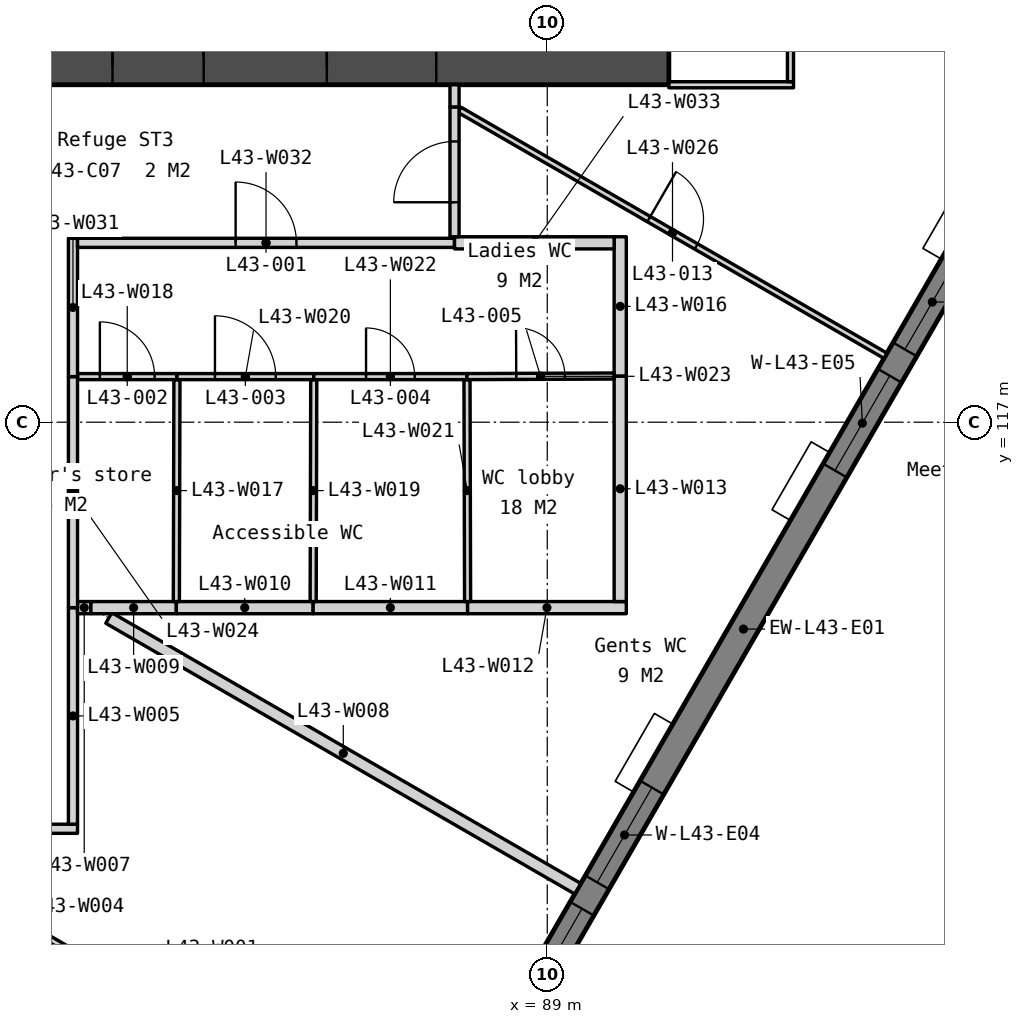
"""IFC4 building model, lengths in metres.
Left out: names, types, materials, properties, quantities, classifications, styles, units other than length and angle.
Written with IfcOpenShell. Run it as: python <this file> out.ifc"""

import sys

from ifc_helpers import new_model, si_unit, direction, frame, frame_2d, origin, place, context, subcontext, project, spatial, polyline, rectangle, outline, extrude, element, fill, save


model = new_model("IFC4")
c1 = context("Model", 3, precision=1e-05, world=origin(), true_north=direction((0.0, 1.0)))
c2 = subcontext(c1, "Body", "Model", "MODEL_VIEW")
j1 = project(units=[si_unit("LENGTHUNIT", "METRE"), si_unit("PLANEANGLEUNIT", "RADIAN")], contexts=[c1])
p1 = place(None, origin())
s1 = spatial("IfcSite", under=j1, at=p1, CompositionType="ELEMENT")
p2 = place(p1, origin())
s2 = spatial("IfcBuilding", under=s1, at=p2, CompositionType="ELEMENT")
p3 = place(p2, frame((0.0, 0.0, 171.5)))
s3 = spatial("IfcBuildingStorey", under=s2, at=p3, CompositionType="ELEMENT", Elevation=171.5)
p4 = place(p3, frame((69.0, 122.85, 0.0), z_axis=(0.0, 0.0, 1.0), x_axis=(1.0, 0.0, 0.0)))
e1 = element("IfcWall", 1, at=p4, inside=s3, PredefinedType="SOLIDWALL", context=c2, shape_type="SweptSolid", body=[
    extrude(rectangle(XDim=22.0, YDim=0.6, at=frame_2d((11.0, 0.0))), origin(), (0.0, 0.0, 1.0), 3.65),
])
p5 = place(p4, frame((16.375, 0.0, 0.0)))
e2 = element("IfcOpeningElement", 2, at=p5, cuts=e1, PredefinedType="OPENING", context=c2, shape_type="SweptSolid", body=[
    extrude(rectangle(XDim=1.8, YDim=2.1, at=frame_2d((0.9, 1.05))), frame((0.0, 0.31, 0.0), z_axis=(0.0, -1.0, 0.0), x_axis=(1.0, 0.0, 0.0)), (0.0, 0.0, 1.0), 0.62),
])
p6 = place(p4, frame((3.825, 0.0, 0.0)))
e3 = element("IfcOpeningElement", 3, at=p6, cuts=e1, PredefinedType="OPENING", context=c2, shape_type="SweptSolid", body=[
    extrude(rectangle(XDim=1.8, YDim=2.1, at=frame_2d((0.9, 1.05))), frame((0.0, 0.31, 0.0), z_axis=(0.0, -1.0, 0.0), x_axis=(1.0, 0.0, 0.0)), (0.0, 0.0, 1.0), 0.62),
])
p7 = place(p4, frame((12.85, 0.0, 0.0)))
e4 = element("IfcOpeningElement", 4, at=p7, cuts=e1, PredefinedType="OPENING", context=c2, shape_type="SweptSolid", body=[
    extrude(rectangle(XDim=1.5, YDim=2.1, at=frame_2d((0.75, 1.05))), frame((0.0, 0.31, 0.0), z_axis=(0.0, -1.0, 0.0), x_axis=(1.0, 0.0, 0.0)), (0.0, 0.0, 1.0), 0.62),
])
p8 = place(p3, frame((82.105, 96.067, -0.15), z_axis=(0.0, 0.0, 1.0), x_axis=(0.499997369791, 0.866026922331, 0.0)))
e5 = element("IfcWall", 5, at=p8, inside=s3, PredefinedType="SOLIDWALL", context=c2, shape_type="SweptSolid", body=[
    extrude(outline(polyline([(40.486, 0.0), (40.486, 3.8), (0.0, 3.8), (0.0, 0.0), (40.486, 0.0)])), frame((0.0, 0.225, 0.0), z_axis=(0.0, -1.0, 0.0), x_axis=(1.0, 0.0, 0.0)), (0.0, 0.0, 1.0), 0.45),
])
p9 = place(p8, frame((3.011, 0.0, 0.95)))
e6 = element("IfcOpeningElement", 6, at=p9, cuts=e5, PredefinedType="OPENING", context=c2, shape_type="SweptSolid", body=[
    extrude(rectangle(XDim=1.8, YDim=2.2, at=frame_2d((0.9, 1.1))), frame((0.0, 0.235, 0.0), z_axis=(0.0, -1.0, 0.0), x_axis=(1.0, 0.0, 0.0)), (0.0, 0.0, 1.0), 0.47),
])
p10 = place(p8, frame((5.311, 0.0, 0.95)))
e7 = element("IfcOpeningElement", 7, at=p10, cuts=e5, PredefinedType="OPENING", context=c2, shape_type="SweptSolid", body=[
    extrude(rectangle(XDim=1.8, YDim=2.2, at=frame_2d((0.9, 1.1))), frame((0.0, 0.235, 0.0), z_axis=(0.0, -1.0, 0.0), x_axis=(1.0, 0.0, 0.0)), (0.0, 0.0, 1.0), 0.47),
])
p11 = place(p8, frame((13.132, 0.0, 0.95)))
e8 = element("IfcOpeningElement", 8, at=p11, cuts=e5, PredefinedType="OPENING", context=c2, shape_type="SweptSolid", body=[
    extrude(rectangle(XDim=1.8, YDim=2.2, at=frame_2d((0.9, 1.1))), frame((0.0, 0.235, 0.0), z_axis=(0.0, -1.0, 0.0), x_axis=(1.0, 0.0, 0.0)), (0.0, 0.0, 1.0), 0.47),
])
p12 = place(p8, frame((15.432, 0.0, 0.95)))
e9 = element("IfcOpeningElement", 9, at=p12, cuts=e5, PredefinedType="OPENING", context=c2, shape_type="SweptSolid", body=[
    extrude(rectangle(XDim=1.8, YDim=2.2, at=frame_2d((0.9, 1.1))), frame((0.0, 0.235, 0.0), z_axis=(0.0, -1.0, 0.0), x_axis=(1.0, 0.0, 0.0)), (0.0, 0.0, 1.0), 0.47),
])
p13 = place(p8, frame((23.254, 0.0, 0.95)))
e10 = element("IfcOpeningElement", 10, at=p13, cuts=e5, PredefinedType="OPENING", context=c2, shape_type="SweptSolid", body=[
    extrude(rectangle(XDim=1.8, YDim=2.2, at=frame_2d((0.9, 1.1))), frame((0.0, 0.235, 0.0), z_axis=(0.0, -1.0, 0.0), x_axis=(1.0, 0.0, 0.0)), (0.0, 0.0, 1.0), 0.47),
])
p14 = place(p8, frame((25.554, 0.0, 0.95)))
e11 = element("IfcOpeningElement", 11, at=p14, cuts=e5, PredefinedType="OPENING", context=c2, shape_type="SweptSolid", body=[
    extrude(rectangle(XDim=1.8, YDim=2.2, at=frame_2d((0.9, 1.1))), frame((0.0, 0.235, 0.0), z_axis=(0.0, -1.0, 0.0), x_axis=(1.0, 0.0, 0.0)), (0.0, 0.0, 1.0), 0.47),
])
p15 = place(p8, frame((33.375, 0.0, 0.95)))
e12 = element("IfcOpeningElement", 12, at=p15, cuts=e5, PredefinedType="OPENING", context=c2, shape_type="SweptSolid", body=[
    extrude(rectangle(XDim=1.8, YDim=2.2, at=frame_2d((0.9, 1.1))), frame((0.0, 0.235, 0.0), z_axis=(0.0, -1.0, 0.0), x_axis=(1.0, 0.0, 0.0)), (0.0, 0.0, 1.0), 0.47),
])
p16 = place(p8, frame((35.675, 0.0, 0.95)))
e13 = element("IfcOpeningElement", 13, at=p16, cuts=e5, PredefinedType="OPENING", context=c2, shape_type="SweptSolid", body=[
    extrude(rectangle(XDim=1.8, YDim=2.2, at=frame_2d((0.9, 1.1))), frame((0.0, 0.235, 0.0), z_axis=(0.0, -1.0, 0.0), x_axis=(1.0, 0.0, 0.0)), (0.0, 0.0, 1.0), 0.47),
])
p17 = place(p3, frame((80.0, 108.969, 0.0), z_axis=(0.0, 0.0, 1.0), x_axis=(0.86602648383, -0.499998129301, 0.0)))
e14 = element("IfcWall", 14, at=p17, inside=s3, PredefinedType="PARTITIONING", context=c2, shape_type="SweptSolid", body=[
    extrude(rectangle(XDim=8.049, YDim=0.1, at=frame_2d((4.025, 0.0))), origin(), (0.0, 0.0, 1.0), 3.65),
])
p18 = place(p17, frame((3.525, 0.0, 0.0)))
e15 = element("IfcOpeningElement", 15, at=p18, cuts=e14, PredefinedType="OPENING", context=c2, shape_type="SweptSolid", body=[
    extrude(rectangle(XDim=1.0, YDim=2.1, at=frame_2d((0.5, 1.05))), frame((0.0, 0.06, 0.0), z_axis=(0.0, -1.0, 0.0), x_axis=(1.0, 0.0, 0.0)), (0.0, 0.0, 1.0), 0.12),
])
p19 = place(p3, frame((78.725, 110.313, 0.0), z_axis=(0.0, 0.0, 1.0), x_axis=(1.0, 0.0, 0.0)))
e16 = element("IfcWall", 16, at=p19, inside=s3, PredefinedType="PARTITIONING", context=c2, shape_type="SweptSolid", body=[
    extrude(rectangle(XDim=2.55, YDim=0.15, at=frame_2d((1.275, 0.0))), origin(), (0.0, 0.0, 1.0), 3.65),
])
p20 = place(p3, frame((81.2, 110.388, 0.0), z_axis=(0.0, 0.0, 1.0), x_axis=(0.0, 1.0, 0.0)))
e17 = element("IfcWall", 17, at=p20, inside=s3, PredefinedType="PARTITIONING", context=c2, shape_type="SweptSolid", body=[
    extrude(rectangle(XDim=3.562, YDim=0.15, at=frame_2d((1.781, 0.0))), origin(), (0.0, 0.0, 1.0), 3.65),
])
p21 = place(p3, frame((81.275, 113.95, 0.0), z_axis=(0.0, 0.0, 1.0), x_axis=(1.0, 0.0, 0.0)))
e18 = element("IfcWall", 18, at=p21, inside=s3, PredefinedType="PARTITIONING", context=c2, shape_type="SweptSolid", body=[
    extrude(rectangle(XDim=0.22, YDim=0.2, at=frame_2d((0.11, 0.0))), origin(), (0.0, 0.0, 1.0), 3.65),
])
p22 = place(p3, frame((81.79, 113.78, 0.0), z_axis=(0.0, 0.0, 1.0), x_axis=(0.866017572094, -0.50001356464, 0.0)))
e19 = element("IfcWall", 19, at=p22, inside=s3, PredefinedType="PARTITIONING", context=c2, shape_type="SweptSolid", body=[
    extrude(rectangle(XDim=8.905, YDim=0.2, at=frame_2d((4.453, 0.0))), origin(), (0.0, 0.0, 1.0), 3.65),
])
p23 = place(p3, frame((81.495, 113.95, 0.0), z_axis=(0.0, 0.0, 1.0), x_axis=(1.0, 0.0, 0.0)))
e20 = element("IfcWall", 20, at=p23, inside=s3, PredefinedType="PARTITIONING", context=c2, shape_type="SweptSolid", body=[
    extrude(rectangle(XDim=1.405, YDim=0.2, at=frame_2d((0.702, 0.0))), origin(), (0.0, 0.0, 1.0), 3.65),
])
p24 = place(p3, frame((82.9, 113.95, 0.0), z_axis=(0.0, 0.0, 1.0), x_axis=(1.0, 0.0, 0.0)))
e21 = element("IfcWall", 21, at=p24, inside=s3, PredefinedType="PARTITIONING", context=c2, shape_type="SweptSolid", body=[
    extrude(rectangle(XDim=2.25, YDim=0.2, at=frame_2d((1.125, 0.0))), origin(), (0.0, 0.0, 1.0), 3.65),
])
p25 = place(p3, frame((85.15, 113.95, 0.0), z_axis=(0.0, 0.0, 1.0), x_axis=(1.0, 0.0, 0.0)))
e22 = element("IfcWall", 22, at=p25, inside=s3, PredefinedType="PARTITIONING", context=c2, shape_type="SweptSolid", body=[
    extrude(rectangle(XDim=2.54, YDim=0.2, at=frame_2d((1.27, 0.0))), origin(), (0.0, 0.0, 1.0), 3.65),
])
p26 = place(p3, frame((87.69, 113.95, 0.0), z_axis=(0.0, 0.0, 1.0), x_axis=(1.0, 0.0, 0.0)))
e23 = element("IfcWall", 23, at=p26, inside=s3, PredefinedType="PARTITIONING", context=c2, shape_type="SweptSolid", body=[
    extrude(rectangle(XDim=2.61, YDim=0.2, at=frame_2d((1.305, 0.0))), origin(), (0.0, 0.0, 1.0), 3.65),
])
p27 = place(p3, frame((90.2, 114.05, 0.0), z_axis=(0.0, 0.0, 1.0), x_axis=(0.0, 1.0, 0.0)))
e24 = element("IfcWall", 24, at=p27, inside=s3, PredefinedType="PARTITIONING", context=c2, shape_type="SweptSolid", body=[
    extrude(rectangle(XDim=3.71, YDim=0.2, at=frame_2d((1.855, 0.0))), origin(), (0.0, 0.0, 1.0), 3.65),
])
p28 = place(p3, frame((90.2, 117.76, 0.0), z_axis=(0.0, 0.0, 1.0), x_axis=(0.0, 1.0, 0.0)))
e25 = element("IfcWall", 25, at=p28, inside=s3, PredefinedType="PARTITIONING", context=c2, shape_type="SweptSolid", body=[
    extrude(rectangle(XDim=2.29, YDim=0.2, at=frame_2d((1.145, 0.0))), origin(), (0.0, 0.0, 1.0), 3.65),
])
p29 = place(p3, frame((82.9, 114.05, 0.0), z_axis=(0.0, 0.0, 1.0), x_axis=(0.002675575707, 0.999996420641, 0.0)))
e26 = element("IfcWall", 26, at=p29, inside=s3, PredefinedType="PARTITIONING", context=c2, shape_type="SweptSolid", body=[
    extrude(rectangle(XDim=3.65, YDim=0.1, at=frame_2d((1.825, 0.0))), origin(), (0.0, 0.0, 1.0), 3.65),
])
p30 = place(p3, frame((81.275, 117.75, 0.0), z_axis=(0.0, 0.0, 1.0), x_axis=(1.0, 0.0, 0.0)))
e27 = element("IfcWall", 27, at=p30, inside=s3, PredefinedType="PARTITIONING", context=c2, shape_type="SweptSolid", body=[
    extrude(rectangle(XDim=1.635, YDim=0.1, at=frame_2d((0.817, 0.0))), origin(), (0.0, 0.0, 1.0), 3.65),
])
p31 = place(p30, frame((0.367, 0.0, 0.0)))
e28 = element("IfcOpeningElement", 28, at=p31, cuts=e27, PredefinedType="OPENING", context=c2, shape_type="SweptSolid", body=[
    extrude(rectangle(XDim=0.9, YDim=2.1, at=frame_2d((0.45, 1.05))), frame((0.0, 0.06, 0.0), z_axis=(0.0, -1.0, 0.0), x_axis=(1.0, 0.0, 0.0)), (0.0, 0.0, 1.0), 0.12),
])
p32 = place(p3, frame((85.15, 114.05, 0.0), z_axis=(0.0, 0.0, 1.0), x_axis=(0.002675575707, 0.999996420641, 0.0)))
e29 = element("IfcWall", 29, at=p32, inside=s3, PredefinedType="PARTITIONING", context=c2, shape_type="SweptSolid", body=[
    extrude(rectangle(XDim=3.65, YDim=0.1, at=frame_2d((1.825, 0.0))), origin(), (0.0, 0.0, 1.0), 3.65),
])
p33 = place(p3, frame((82.91, 117.75, 0.0), z_axis=(0.0, 0.0, 1.0), x_axis=(1.0, 0.0, 0.0)))
e30 = element("IfcWall", 30, at=p33, inside=s3, PredefinedType="PARTITIONING", context=c2, shape_type="SweptSolid", body=[
    extrude(rectangle(XDim=2.25, YDim=0.1, at=frame_2d((1.125, 0.0))), origin(), (0.0, 0.0, 1.0), 3.65),
])
p34 = place(p33, frame((0.625, 0.0, 0.0)))
e31 = element("IfcOpeningElement", 31, at=p34, cuts=e30, PredefinedType="OPENING", context=c2, shape_type="SweptSolid", body=[
    extrude(rectangle(XDim=1.0, YDim=2.1, at=frame_2d((0.5, 1.05))), frame((0.0, 0.06, 0.0), z_axis=(0.0, -1.0, 0.0), x_axis=(1.0, 0.0, 0.0)), (0.0, 0.0, 1.0), 0.12),
])
p35 = place(p3, frame((87.69, 114.05, 0.0), z_axis=(0.0, 0.0, 1.0), x_axis=(-0.002608686776, 0.999996597371, 0.0)))
e32 = element("IfcWall", 32, at=p35, inside=s3, PredefinedType="PARTITIONING", context=c2, shape_type="SweptSolid", body=[
    extrude(rectangle(XDim=3.65, YDim=0.1, at=frame_2d((1.825, 0.0))), origin(), (0.0, 0.0, 1.0), 3.65),
])
p36 = place(p3, frame((85.16, 117.75, 0.0), z_axis=(0.0, 0.0, 1.0), x_axis=(1.0, 0.0, 0.0)))
e33 = element("IfcWall", 33, at=p36, inside=s3, PredefinedType="PARTITIONING", context=c2, shape_type="SweptSolid", body=[
    extrude(rectangle(XDim=2.52, YDim=0.1, at=frame_2d((1.26, 0.0))), origin(), (0.0, 0.0, 1.0), 3.65),
])
p37 = place(p36, frame((0.86, 0.0, 0.0)))
e34 = element("IfcOpeningElement", 34, at=p37, cuts=e33, PredefinedType="OPENING", context=c2, shape_type="SweptSolid", body=[
    extrude(rectangle(XDim=0.8, YDim=2.1, at=frame_2d((0.4, 1.05))), frame((0.0, 0.06, 0.0), z_axis=(0.0, -1.0, 0.0), x_axis=(1.0, 0.0, 0.0)), (0.0, 0.0, 1.0), 0.12),
])
p38 = place(p3, frame((87.68, 117.75, 0.0), z_axis=(0.0, 0.0, 1.0), x_axis=(0.999992261016, 0.003934197335, 0.0)))
e35 = element("IfcWall", 35, at=p38, inside=s3, PredefinedType="PARTITIONING", context=c2, shape_type="SweptSolid", body=[
    extrude(rectangle(XDim=2.42, YDim=0.1, at=frame_2d((1.21, 0.0))), origin(), (0.0, 0.0, 1.0), 3.65),
])
p39 = place(p38, frame((0.81, 0.0, 0.0)))
e36 = element("IfcOpeningElement", 36, at=p39, cuts=e35, PredefinedType="OPENING", context=c2, shape_type="SweptSolid", body=[
    extrude(rectangle(XDim=0.8, YDim=2.1, at=frame_2d((0.4, 1.05))), frame((0.0, 0.06, 0.0), z_axis=(0.0, -1.0, 0.0), x_axis=(1.0, 0.0, 0.0)), (0.0, 0.0, 1.0), 0.12),
])
p40 = place(p3, frame((81.2, 113.95, 0.0), z_axis=(0.0, 0.0, 1.0), x_axis=(0.0, 1.0, 0.0)))
e37 = element("IfcWall", 37, at=p40, inside=s3, PredefinedType="PARTITIONING", context=c2, shape_type="SweptSolid", body=[
    extrude(rectangle(XDim=3.8, YDim=0.15, at=frame_2d((1.9, 0.0))), origin(), (0.0, 0.0, 1.0), 3.65),
])
p41 = place(p3, frame((87.557, 122.137, 0.0), z_axis=(0.0, 0.0, 1.0), x_axis=(0.866029768103, -0.499992440702, 0.0)))
e38 = element("IfcWall", 38, at=p41, inside=s3, PredefinedType="PARTITIONING", context=c2, shape_type="SweptSolid", body=[
    extrude(rectangle(XDim=8.089, YDim=0.1, at=frame_2d((4.044, 0.0))), origin(), (0.0, 0.0, 1.0), 3.65),
])
p42 = place(p41, frame((3.594, 0.0, 0.0)))
e39 = element("IfcOpeningElement", 39, at=p42, cuts=e38, PredefinedType="OPENING", context=c2, shape_type="SweptSolid", body=[
    extrude(rectangle(XDim=0.9, YDim=2.1, at=frame_2d((0.45, 1.05))), frame((0.0, 0.06, 0.0), z_axis=(0.0, -1.0, 0.0), x_axis=(1.0, 0.0, 0.0)), (0.0, 0.0, 1.0), 0.12),
])
p43 = place(p3, frame((81.2, 117.75, 0.0), z_axis=(0.0, 0.0, 1.0), x_axis=(0.0, 1.0, 0.0)))
e40 = element("IfcWall", 40, at=p43, inside=s3, PredefinedType="PARTITIONING", context=c2, shape_type="SweptSolid", body=[
    extrude(rectangle(XDim=2.275, YDim=0.15, at=frame_2d((1.137, 0.0))), origin(), (0.0, 0.0, 1.0), 3.65),
])
p44 = place(p3, frame((81.275, 119.95, 0.0), z_axis=(0.0, 0.0, 1.0), x_axis=(1.0, 0.0, 0.0)))
e41 = element("IfcWall", 41, at=p44, inside=s3, PredefinedType="PARTITIONING", context=c2, shape_type="SweptSolid", body=[
    extrude(rectangle(XDim=6.2, YDim=0.15, at=frame_2d((3.1, 0.0))), origin(), (0.0, 0.0, 1.0), 3.65),
])
p45 = place(p44, frame((2.6, 0.0, 0.0)))
e42 = element("IfcOpeningElement", 42, at=p45, cuts=e41, PredefinedType="OPENING", context=c2, shape_type="SweptSolid", body=[
    extrude(rectangle(XDim=1.0, YDim=2.1, at=frame_2d((0.5, 1.05))), frame((0.0, 0.085, 0.0), z_axis=(0.0, -1.0, 0.0), x_axis=(1.0, 0.0, 0.0)), (0.0, 0.0, 1.0), 0.17),
])
p46 = place(p3, frame((87.475, 119.95, 0.0), z_axis=(0.0, 0.0, 1.0), x_axis=(1.0, 0.0, 0.0)))
e43 = element("IfcWall", 43, at=p46, inside=s3, PredefinedType="PARTITIONING", context=c2, shape_type="SweptSolid", body=[
    extrude(rectangle(XDim=2.625, YDim=0.2, at=frame_2d((1.312, 0.0))), origin(), (0.0, 0.0, 1.0), 3.65),
])
p47 = place(p3, frame((87.475, 120.05, 0.0), z_axis=(0.0, 0.0, 1.0), x_axis=(0.0, 1.0, 0.0)))
e44 = element("IfcWall", 44, at=p47, inside=s3, PredefinedType="PARTITIONING", context=c2, shape_type="SweptSolid", body=[
    extrude(rectangle(XDim=2.135, YDim=0.15, at=frame_2d((1.067, 0.0))), origin(), (0.0, 0.0, 1.0), 3.65),
])
p48 = place(p47, frame((0.567, 0.0, 0.0)))
e45 = element("IfcOpeningElement", 45, at=p48, cuts=e44, PredefinedType="OPENING", context=c2, shape_type="SweptSolid", body=[
    extrude(rectangle(XDim=1.0, YDim=2.1, at=frame_2d((0.5, 1.05))), frame((0.0, 0.085, 0.0), z_axis=(0.0, -1.0, 0.0), x_axis=(1.0, 0.0, 0.0)), (0.0, 0.0, 1.0), 0.17),
])
p49 = place(p3, frame((87.475, 122.185, 0.0), z_axis=(0.0, 0.0, 1.0), x_axis=(0.0, 1.0, 0.0)))
e46 = element("IfcWall", 46, at=p49, inside=s3, PredefinedType="PARTITIONING", context=c2, shape_type="SweptSolid", body=[
    extrude(rectangle(XDim=0.365, YDim=0.15, at=frame_2d((0.183, 0.0))), origin(), (0.0, 0.0, 1.0), 3.65),
])
p50 = place(p3, frame((91.0, 122.55, 0.0), z_axis=(0.0, 0.0, 1.0), x_axis=(1.0, 0.0, 0.0)))
e47 = element("IfcWall", 47, at=p50, inside=s3, PredefinedType="PARTITIONING", context=c2, shape_type="SweptSolid", body=[
    extrude(rectangle(XDim=2.05, YDim=0.1, at=frame_2d((1.025, 0.0))), origin(), (0.0, 0.0, 1.0), 3.65),
])
p51 = place(p3, frame((93.0, 122.6, 0.0), z_axis=(0.0, 0.0, 1.0), x_axis=(0.0, 1.0, 0.0)))
e48 = element("IfcWall", 48, at=p51, inside=s3, PredefinedType="PARTITIONING", context=c2, shape_type="SweptSolid", body=[
    extrude(rectangle(XDim=1.95, YDim=0.1, at=frame_2d((0.975, 0.0))), origin(), (0.0, 0.0, 1.0), 3.65),
])
p52 = place(p5, origin())
e49 = element("IfcDoor", 49, at=p52, inside=s3, OperationType="DOUBLE_DOOR_DOUBLE_SWING", PredefinedType="DOOR", context=c2, shape_type="SweptSolid", body=[
    extrude(rectangle(XDim=1.8, YDim=2.1, at=frame_2d((0.9, 1.05))), frame((0.0, 0.025, 0.0), z_axis=(0.0, -1.0, 0.0), x_axis=(1.0, 0.0, 0.0)), (0.0, 0.0, 1.0), 0.05),
])
fill(e2, e49)
p53 = place(p7, origin())
e50 = element("IfcDoor", 50, at=p53, inside=s3, OperationType="DOUBLE_DOOR_DOUBLE_SWING", PredefinedType="DOOR", context=c2, shape_type="SweptSolid", body=[
    extrude(rectangle(XDim=1.5, YDim=2.1, at=frame_2d((0.75, 1.05))), frame((0.0, 0.025, 0.0), z_axis=(0.0, -1.0, 0.0), x_axis=(1.0, 0.0, 0.0)), (0.0, 0.0, 1.0), 0.05),
])
fill(e4, e50)
p54 = place(p11, origin())
e51 = element("IfcWindow", 51, at=p54, inside=s3, PartitioningType="SINGLE_PANEL", PredefinedType="WINDOW", context=c2, shape_type="SweptSolid", body=[
    extrude(rectangle(XDim=1.8, YDim=2.2, at=frame_2d((0.9, 1.1))), frame((0.0, 0.03, 0.0), z_axis=(0.0, -1.0, 0.0), x_axis=(1.0, 0.0, 0.0)), (0.0, 0.0, 1.0), 0.06),
])
fill(e8, e51)
p55 = place(p12, origin())
e52 = element("IfcWindow", 52, at=p55, inside=s3, PartitioningType="SINGLE_PANEL", PredefinedType="WINDOW", context=c2, shape_type="SweptSolid", body=[
    extrude(rectangle(XDim=1.8, YDim=2.2, at=frame_2d((0.9, 1.1))), frame((0.0, 0.03, 0.0), z_axis=(0.0, -1.0, 0.0), x_axis=(1.0, 0.0, 0.0)), (0.0, 0.0, 1.0), 0.06),
])
fill(e9, e52)
p56 = place(p13, origin())
e53 = element("IfcWindow", 53, at=p56, inside=s3, PartitioningType="SINGLE_PANEL", PredefinedType="WINDOW", context=c2, shape_type="SweptSolid", body=[
    extrude(rectangle(XDim=1.8, YDim=2.2, at=frame_2d((0.9, 1.1))), frame((0.0, 0.03, 0.0), z_axis=(0.0, -1.0, 0.0), x_axis=(1.0, 0.0, 0.0)), (0.0, 0.0, 1.0), 0.06),
])
fill(e10, e53)
p57 = place(p14, origin())
e54 = element("IfcWindow", 54, at=p57, inside=s3, PartitioningType="SINGLE_PANEL", PredefinedType="WINDOW", context=c2, shape_type="SweptSolid", body=[
    extrude(rectangle(XDim=1.8, YDim=2.2, at=frame_2d((0.9, 1.1))), frame((0.0, 0.03, 0.0), z_axis=(0.0, -1.0, 0.0), x_axis=(1.0, 0.0, 0.0)), (0.0, 0.0, 1.0), 0.06),
])
fill(e11, e54)
p58 = place(p45, origin())
e55 = element("IfcDoor", 55, at=p58, inside=s3, OperationType="SINGLE_SWING_LEFT", PredefinedType="DOOR", context=c2, shape_type="SweptSolid", body=[
    extrude(rectangle(XDim=1.0, YDim=2.1, at=frame_2d((0.5, 1.05))), frame((0.0, 0.025, 0.0), z_axis=(0.0, -1.0, 0.0), x_axis=(1.0, 0.0, 0.0)), (0.0, 0.0, 1.0), 0.05),
])
fill(e42, e55)
p59 = place(p31, origin())
e56 = element("IfcDoor", 56, at=p59, inside=s3, OperationType="SINGLE_SWING_LEFT", PredefinedType="DOOR", context=c2, shape_type="SweptSolid", body=[
    extrude(rectangle(XDim=0.9, YDim=2.1, at=frame_2d((0.45, 1.05))), frame((0.0, 0.025, 0.0), z_axis=(0.0, -1.0, 0.0), x_axis=(1.0, 0.0, 0.0)), (0.0, 0.0, 1.0), 0.05),
])
fill(e28, e56)
p60 = place(p34, origin())
e57 = element("IfcDoor", 57, at=p60, inside=s3, OperationType="SINGLE_SWING_LEFT", PredefinedType="DOOR", context=c2, shape_type="SweptSolid", body=[
    extrude(rectangle(XDim=1.0, YDim=2.1, at=frame_2d((0.5, 1.05))), frame((0.0, 0.025, 0.0), z_axis=(0.0, -1.0, 0.0), x_axis=(1.0, 0.0, 0.0)), (0.0, 0.0, 1.0), 0.05),
])
fill(e31, e57)
p61 = place(p37, origin())
e58 = element("IfcDoor", 58, at=p61, inside=s3, OperationType="SINGLE_SWING_LEFT", PredefinedType="DOOR", context=c2, shape_type="SweptSolid", body=[
    extrude(rectangle(XDim=0.8, YDim=2.1, at=frame_2d((0.4, 1.05))), frame((0.0, 0.025, 0.0), z_axis=(0.0, -1.0, 0.0), x_axis=(1.0, 0.0, 0.0)), (0.0, 0.0, 1.0), 0.05),
])
fill(e34, e58)
p62 = place(p39, origin())
e59 = element("IfcDoor", 59, at=p62, inside=s3, OperationType="SINGLE_SWING_LEFT", PredefinedType="DOOR", context=c2, shape_type="SweptSolid", body=[
    extrude(rectangle(XDim=0.8, YDim=2.1, at=frame_2d((0.4, 1.05))), frame((0.0, 0.025, 0.0), z_axis=(0.0, -1.0, 0.0), x_axis=(1.0, 0.0, 0.0)), (0.0, 0.0, 1.0), 0.05),
])
fill(e36, e59)
p63 = place(p48, origin())
e60 = element("IfcDoor", 60, at=p63, inside=s3, OperationType="SINGLE_SWING_LEFT", PredefinedType="DOOR", context=c2, shape_type="SweptSolid", body=[
    extrude(rectangle(XDim=1.0, YDim=2.1, at=frame_2d((0.5, 1.05))), frame((0.0, 0.025, 0.0), z_axis=(0.0, -1.0, 0.0), x_axis=(1.0, 0.0, 0.0)), (0.0, 0.0, 1.0), 0.05),
])
fill(e45, e60)
p64 = place(p42, origin())
e61 = element("IfcDoor", 61, at=p64, inside=s3, OperationType="SINGLE_SWING_LEFT", PredefinedType="DOOR", context=c2, shape_type="SweptSolid", body=[
    extrude(rectangle(XDim=0.9, YDim=2.1, at=frame_2d((0.45, 1.05))), frame((0.0, 0.025, 0.0), z_axis=(0.0, -1.0, 0.0), x_axis=(1.0, 0.0, 0.0)), (0.0, 0.0, 1.0), 0.05),
])
fill(e39, e61)
save(model, sys.argv[1])
